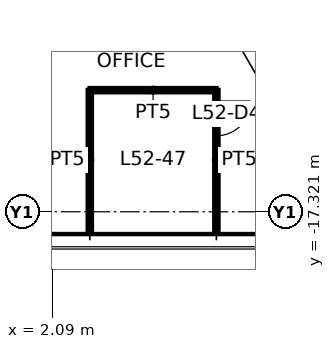
"""IFC4 building model, lengths in metres.
Left out: names, types, materials, properties, quantities, classifications, styles, units other than length and angle.
Written with IfcOpenShell. Run it as: python <this file> out.ifc"""

import sys

from ifc_helpers import new_model, si_unit, direction, frame, frame_2d, origin, place, context, subcontext, project, spatial, rectangle, extrude, element, fill, save


model = new_model("IFC4")
c1 = context("Model", 3, precision=1e-05, world=origin(), true_north=direction((0.0, 1.0)))
c2 = subcontext(c1, "Body", "Model", "MODEL_VIEW")
j1 = project(units=[si_unit("LENGTHUNIT", "METRE"), si_unit("PLANEANGLEUNIT", "RADIAN")], contexts=[c1])
p1 = place(None, origin())
s1 = spatial("IfcSite", under=j1, at=p1, CompositionType="ELEMENT")
p2 = place(p1, origin())
s2 = spatial("IfcBuilding", under=s1, at=p2, CompositionType="ELEMENT")
p3 = place(p2, frame((0.0, 0.0, 208.3)))
s3 = spatial("IfcBuildingStorey", under=s2, at=p3, CompositionType="ELEMENT", Elevation=208.3)
p4 = place(p3, frame((3.077, -17.801, 0.0), z_axis=(0.0, 0.0, 1.0), x_axis=(0.0, 1.0, 0.0)))
e1 = element("IfcWall", 1, at=p4, inside=s3, PredefinedType="PARTITIONING", context=c2, shape_type="SweptSolid", body=[
    extrude(rectangle(XDim=3.68, YDim=0.1, at=frame_2d((1.84, 0.0))), origin(), (0.0, 0.0, 1.0), 3.55),
])
p5 = place(p3, frame((3.077, -14.121, 0.0), z_axis=(0.0, 0.0, 1.0), x_axis=(1.0, 0.0, 0.0)))
e2 = element("IfcWall", 2, at=p5, inside=s3, PredefinedType="PARTITIONING", context=c2, shape_type="SweptSolid", body=[
    extrude(rectangle(XDim=3.331, YDim=0.1, at=frame_2d((1.666, 0.0))), origin(), (0.0, 0.0, 1.0), 3.55),
])
p6 = place(p3, frame((6.408, -14.121, 0.0), z_axis=(0.0, 0.0, 1.0), x_axis=(0.0, -1.0, 0.0)))
e3 = element("IfcWall", 3, at=p6, inside=s3, PredefinedType="PARTITIONING", context=c2, shape_type="SweptSolid", body=[
    extrude(rectangle(XDim=3.68, YDim=0.1, at=frame_2d((1.84, 0.0))), origin(), (0.0, 0.0, 1.0), 3.55),
])
p7 = place(p6, frame((0.3, 0.0, 0.0)))
e4 = element("IfcOpeningElement", 4, at=p7, cuts=e3, PredefinedType="OPENING", context=c2, shape_type="SweptSolid", body=[
    extrude(rectangle(XDim=0.9, YDim=2.1, at=frame_2d((0.45, 1.05))), frame((0.0, 0.06, 0.0), z_axis=(0.0, -1.0, 0.0), x_axis=(1.0, 0.0, 0.0)), (0.0, 0.0, 1.0), 0.12),
])
p8 = place(p7, origin())
e5 = element("IfcDoor", 5, at=p8, inside=s3, OperationType="SINGLE_SWING_LEFT", PredefinedType="DOOR", context=c2, shape_type="SweptSolid", body=[
    extrude(rectangle(XDim=0.9, YDim=2.1, at=frame_2d((0.45, 1.05))), frame((0.0, 0.025, 0.0), z_axis=(0.0, -1.0, 0.0), x_axis=(1.0, 0.0, 0.0)), (0.0, 0.0, 1.0), 0.05),
])
fill(e4, e5)
save(model, sys.argv[1])
